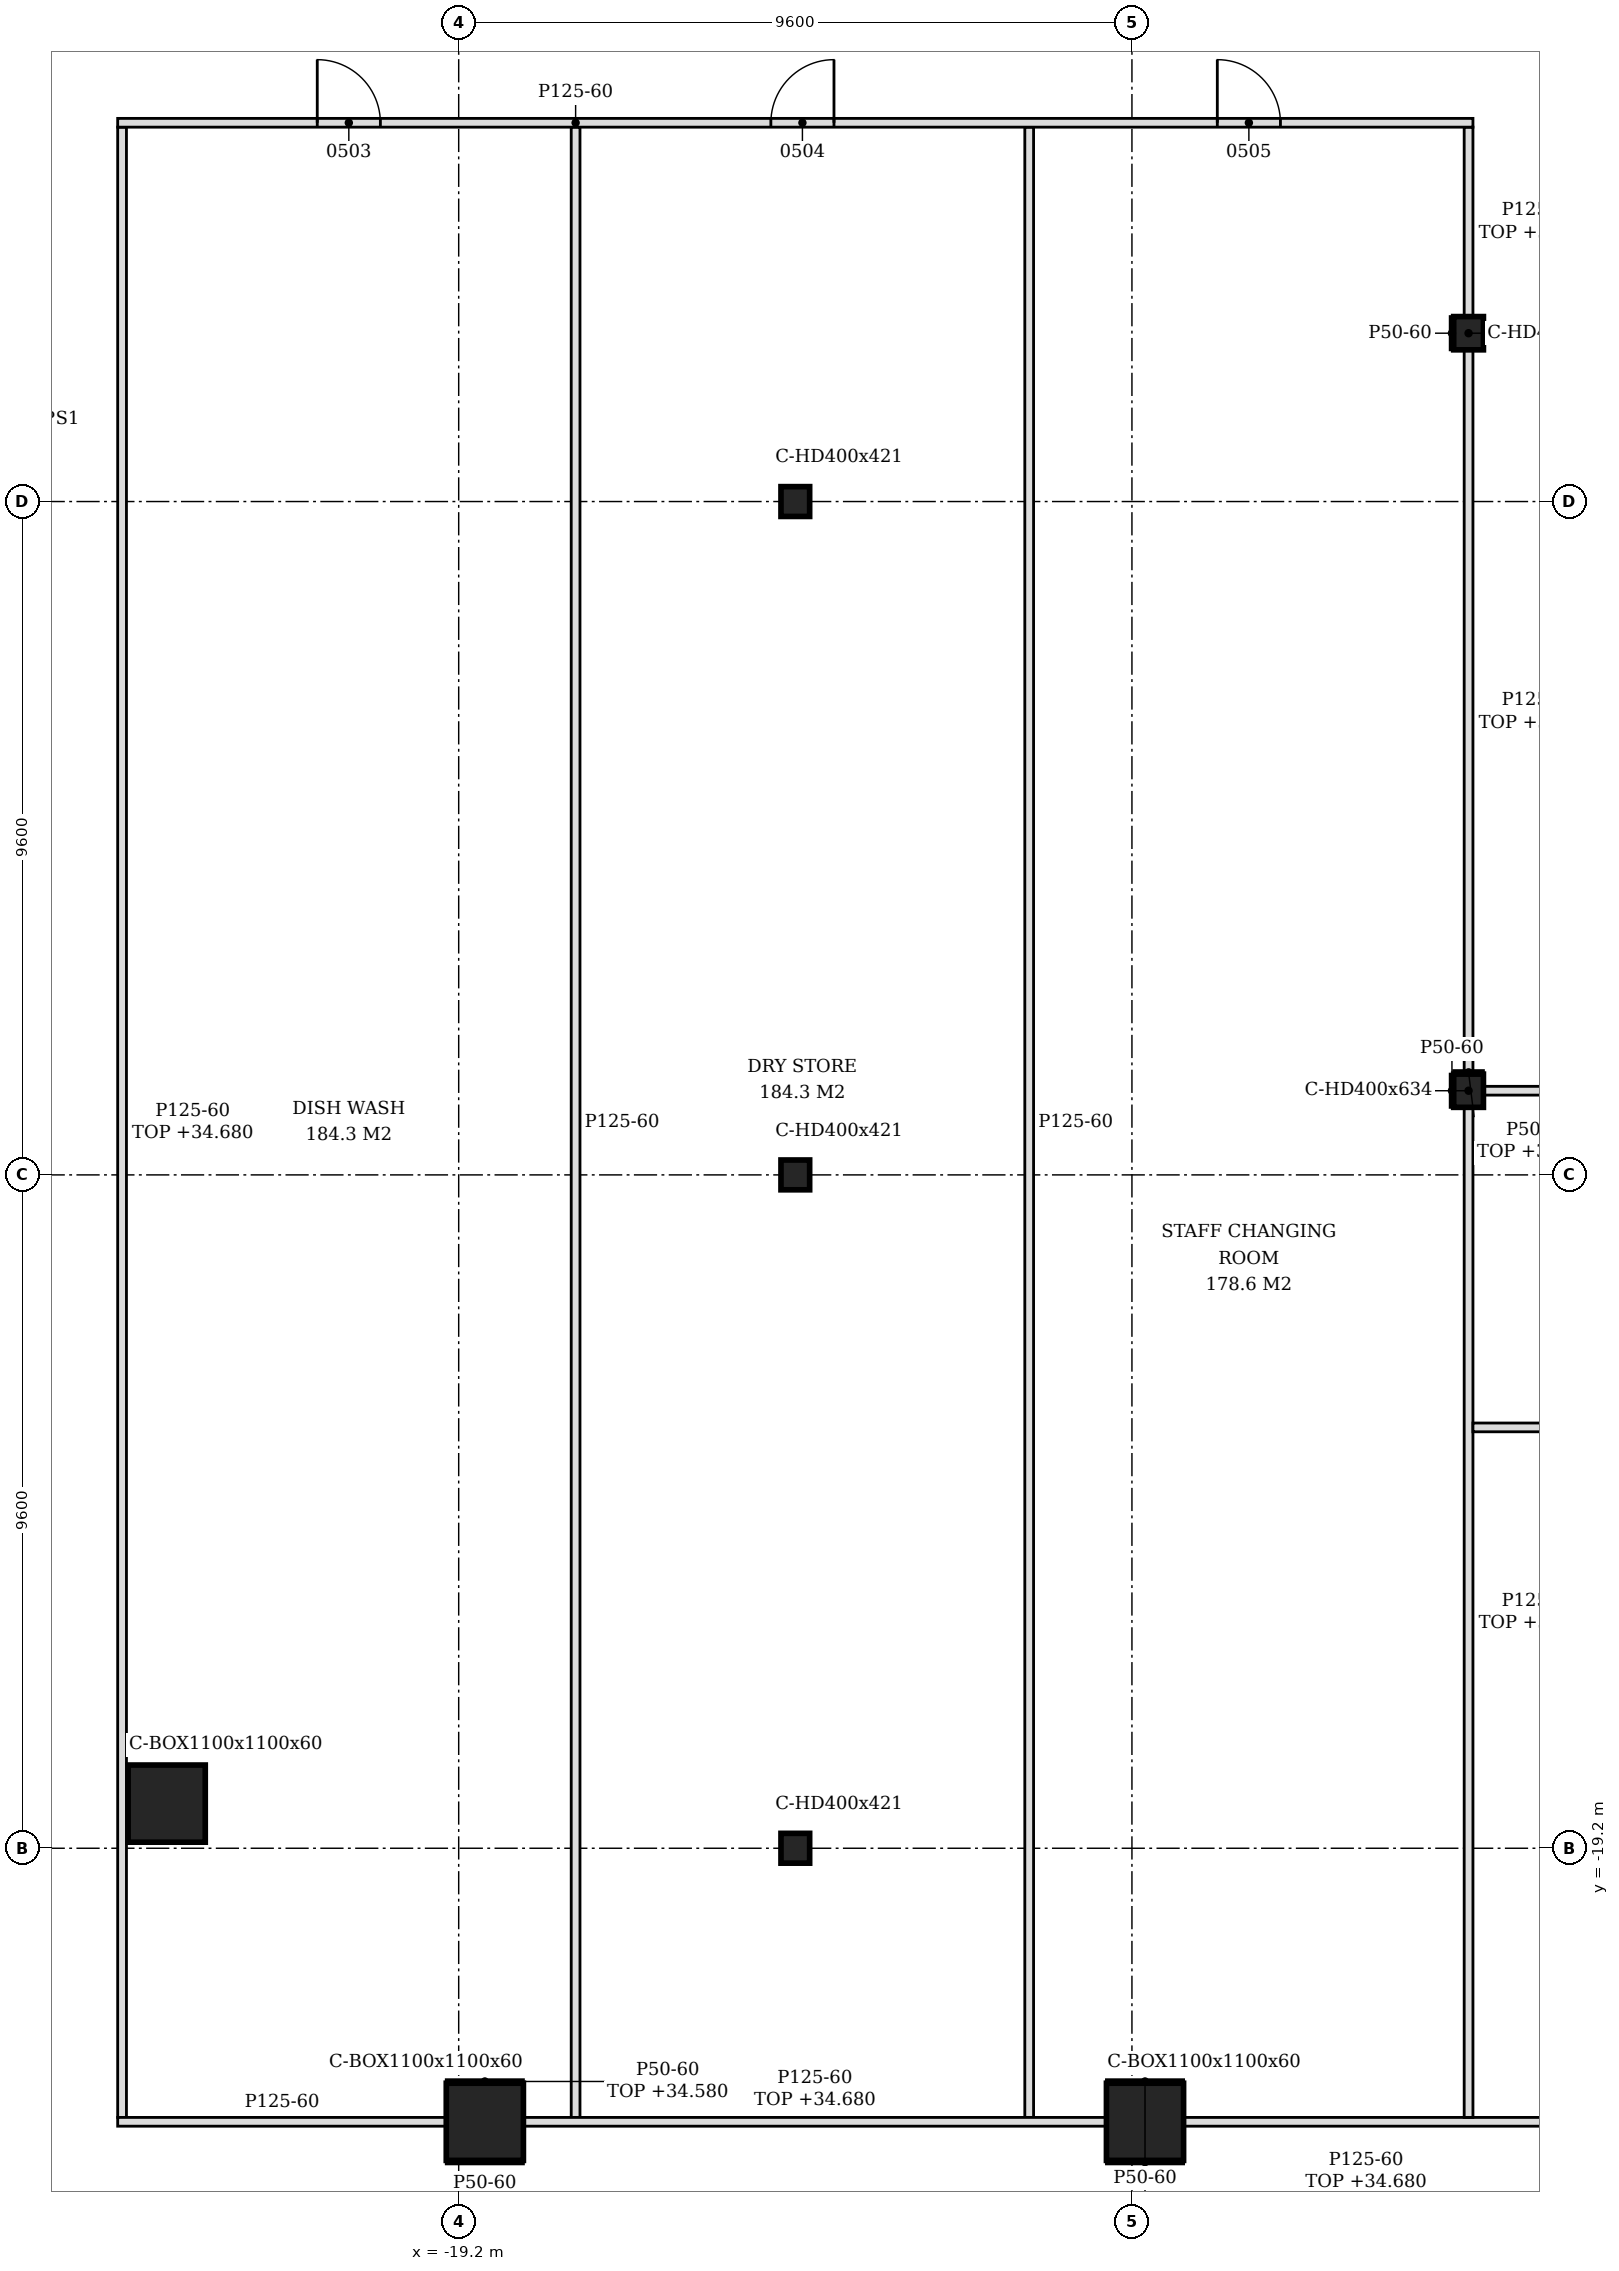
"""IFC4 building model, lengths in metres.
Left out: names, types, materials, properties, quantities, classifications, styles, units other than length and angle.
Written with IfcOpenShell. Run it as: python <this file> out.ifc"""

import sys

from ifc_helpers import new_model, si_unit, direction, frame, frame_2d, origin, origin_2d, place, context, subcontext, project, spatial, polyline, rectangle, hollow_rectangle, i_section, outline, extrude, element, fill, save


model = new_model("IFC4")
c1 = context("Model", 3, precision=1e-05, world=origin(), true_north=direction((0.0, 1.0)))
c2 = subcontext(c1, "Body", "Model", "MODEL_VIEW")
j1 = project(units=[si_unit("LENGTHUNIT", "METRE"), si_unit("PLANEANGLEUNIT", "RADIAN")], contexts=[c1])
p1 = place(None, origin())
s1 = spatial("IfcSite", under=j1, at=p1, CompositionType="ELEMENT")
p2 = place(p1, origin())
s2 = spatial("IfcBuilding", under=s1, at=p2, CompositionType="ELEMENT")
p3 = place(p2, frame((0.0, 0.0, 30.6)))
s3 = spatial("IfcBuildingStorey", under=s2, at=p3, CompositionType="ELEMENT", Elevation=30.6)
for number, where, z_axis, x_axis in (
    (1, (-18.827, -23.1, -0.2), (0.0, 0.0, 1.0), (1.0, 0.0, 0.0)),
    (2, (-9.414, -23.1, -0.2), (0.0, 0.0, 1.0), (1.0, 0.0, 0.0)),
    (3, (-23.364, -18.564, -0.2), (0.0, 0.0, 1.0), (1.0, 0.0, 0.0)),
):
    element("IfcColumn", number, at=place(p3, frame(where, z_axis=z_axis, x_axis=x_axis)), inside=s3, PredefinedType="COLUMN", context=c2, shape_type="SweptSolid", body=[
        extrude(hollow_rectangle(XDim=1.1, YDim=1.1, WallThickness=0.06, at=origin_2d()), origin(), (0.0, 0.0, 1.0), 4.8),
    ])
for number, where, z_axis, x_axis in (
    (4, (-4.8, -8.4, -0.2), (0.0, 0.0, 1.0), (1.0, 0.0, 0.0)),
    (5, (-4.8, 2.4, -0.2), (0.0, 0.0, 1.0), (1.0, 0.0, 0.0)),
):
    element("IfcColumn", number, at=place(p3, frame(where, z_axis=z_axis, x_axis=x_axis)), inside=s3, PredefinedType="COLUMN", context=c2, shape_type="SweptSolid", body=[
        extrude(i_section(OverallWidth=0.424, OverallDepth=0.474, WebThickness=0.048, FlangeThickness=0.077, FilletRadius=0.015, at=origin_2d()), origin(), (0.0, 0.0, 1.0), 4.8),
    ])
for number, where, z_axis, x_axis in (
    (6, (-14.4, -19.2, -0.2), (0.0, 0.0, 1.0), (1.0, 0.0, 0.0)),
    (7, (-14.4, -9.6, -0.2), (0.0, 0.0, 1.0), (1.0, 0.0, 0.0)),
    (8, (-14.4, 0.0, -0.2), (0.0, 0.0, 1.0), (1.0, 0.0, 0.0)),
):
    element("IfcColumn", number, at=place(p3, frame(where, z_axis=z_axis, x_axis=x_axis)), inside=s3, PredefinedType="COLUMN", context=c2, shape_type="SweptSolid", body=[
        extrude(i_section(OverallWidth=0.409, OverallDepth=0.425, WebThickness=0.033, FlangeThickness=0.052, FilletRadius=0.015, at=origin_2d()), origin(), (0.0, 0.0, 1.0), 4.8),
    ])
p4 = place(p3, frame((-24.062, -23.1, 0.0), z_axis=(0.0, 0.0, 1.0), x_axis=(1.0, 0.0, 0.0)))
e9 = element("IfcWall", 9, at=p4, inside=s3, PredefinedType="PARTITIONING", context=c2, shape_type="SweptSolid", body=[
    extrude(rectangle(XDim=4.685, YDim=0.125, at=frame_2d((2.343, 0.0))), origin(), (0.0, 0.0, 1.0), 4.6),
])
p5 = place(p3, frame((-18.277, -23.1, 0.0), z_axis=(0.0, 0.0, 1.0), x_axis=(1.0, 0.0, 0.0)))
e10 = element("IfcWall", 10, at=p5, inside=s3, PredefinedType="PARTITIONING", context=c2, shape_type="SweptSolid", body=[
    extrude(rectangle(XDim=8.313, YDim=0.125, at=frame_2d((4.157, 0.0))), origin(), (0.0, 0.0, 1.0), 4.08),
])
p6 = place(p3, frame((-8.864, -23.1, 0.0), z_axis=(0.0, 0.0, 1.0), x_axis=(1.0, 0.0, 0.0)))
e11 = element("IfcWall", 11, at=p6, inside=s3, PredefinedType="PARTITIONING", context=c2, shape_type="SweptSolid", body=[
    extrude(rectangle(XDim=8.313, YDim=0.125, at=frame_2d((4.157, 0.0))), origin(), (0.0, 0.0, 1.0), 4.08),
])
p7 = place(p6, frame((6.614, 0.0, 0.0)))
e12 = element("IfcOpeningElement", 12, at=p7, cuts=e11, PredefinedType="OPENING", context=c2, shape_type="SweptSolid", body=[
    extrude(rectangle(XDim=0.9, YDim=2.1, at=frame_2d((0.45, 1.05))), frame((0.0, 0.073, 0.0), z_axis=(0.0, -1.0, 0.0), x_axis=(1.0, 0.0, 0.0)), (0.0, 0.0, 1.0), 0.145),
])
p8 = place(p3, frame((-24.0, -23.038, 0.0), z_axis=(0.0, 0.0, 1.0), x_axis=(0.0, 1.0, 0.0)))
e13 = element("IfcWall", 13, at=p8, inside=s3, PredefinedType="PARTITIONING", context=c2, shape_type="SweptSolid", body=[
    extrude(outline(polyline([(0.0, 0.0), (28.375, 0.0), (28.375, 4.08), (23.188, 4.08), (23.186, 3.88), (22.887, 3.88), (22.885, 4.08), (13.587, 4.08), (13.585, 3.88), (13.288, 3.88), (13.285, 4.08), (3.988, 4.08), (3.986, 3.98), (3.688, 3.98), (3.686, 4.08), (0.0, 4.08), (0.0, 0.0)])), frame((0.0, 0.062, 0.0), z_axis=(0.0, -1.0, 0.0), x_axis=(1.0, 0.0, 0.0)), (0.0, 0.0, 1.0), 0.125),
])
p9 = place(p3, frame((-17.533, -23.038, 0.0), z_axis=(0.0, 0.0, 1.0), x_axis=(0.0, 1.0, 0.0)))
e14 = element("IfcWall", 14, at=p9, inside=s3, PredefinedType="PARTITIONING", context=c2, shape_type="SweptSolid", body=[
    extrude(outline(polyline([(0.0, 0.0), (28.375, 0.0), (28.375, 4.6), (23.188, 4.6), (23.186, 3.88), (22.887, 3.88), (22.885, 4.6), (13.587, 4.6), (13.585, 3.88), (13.288, 3.88), (13.285, 4.6), (0.087, 4.6), (0.085, 4.08), (0.0, 4.08), (0.0, 0.0)])), frame((0.0, 0.062, 0.0), z_axis=(0.0, -1.0, 0.0), x_axis=(1.0, 0.0, 0.0)), (0.0, 0.0, 1.0), 0.125),
])
p10 = place(p3, frame((-11.065, -23.038, 0.0), z_axis=(0.0, 0.0, 1.0), x_axis=(0.0, 1.0, 0.0)))
e15 = element("IfcWall", 15, at=p10, inside=s3, PredefinedType="PARTITIONING", context=c2, shape_type="SweptSolid", body=[
    extrude(outline(polyline([(0.0, 0.0), (28.375, 0.0), (28.375, 4.6), (23.188, 4.6), (23.186, 4.08), (22.887, 4.08), (22.885, 4.6), (0.087, 4.6), (0.085, 4.08), (0.0, 4.08), (0.0, 0.0)])), frame((0.0, 0.062, 0.0), z_axis=(0.0, -1.0, 0.0), x_axis=(1.0, 0.0, 0.0)), (0.0, 0.0, 1.0), 0.125),
])
p11 = place(p3, frame((-4.8, -23.038, 0.0), z_axis=(0.0, 0.0, 1.0), x_axis=(0.0, 1.0, 0.0)))
e16 = element("IfcWall", 16, at=p11, inside=s3, PredefinedType="PARTITIONING", context=c2, shape_type="SweptSolid", body=[
    extrude(rectangle(XDim=14.401, YDim=0.125, at=frame_2d((7.2, 0.0))), origin(), (0.0, 0.0, 1.0), 3.98),
])
p12 = place(p3, frame((-4.738, -13.2, 0.0), z_axis=(0.0, 0.0, 1.0), x_axis=(1.0, 0.0, 0.0)))
e17 = element("IfcWall", 17, at=p12, inside=s3, PredefinedType="PARTITIONING", context=c2, shape_type="SweptSolid", body=[
    extrude(outline(polyline([(0.0, 0.0), (23.875, 0.0), (23.875, 3.98), (23.788, 3.98), (23.785, 4.6), (19.288, 4.6), (19.285, 3.98), (18.988, 3.98), (18.986, 4.6), (14.488, 4.6), (14.486, 3.98), (14.188, 3.98), (14.186, 4.6), (9.688, 4.6), (9.686, 3.98), (9.387, 3.98), (9.385, 4.6), (4.887, 4.6), (4.885, 3.98), (4.587, 3.98), (4.585, 4.6), (0.087, 4.6), (0.085, 3.98), (0.0, 3.98), (0.0, 0.0)])), frame((0.0, 0.062, 0.0), z_axis=(0.0, -1.0, 0.0), x_axis=(1.0, 0.0, 0.0)), (0.0, 0.0, 1.0), 0.125),
])
p13 = place(p3, frame((-4.588, -8.4, 0.0), z_axis=(0.0, 0.0, 1.0), x_axis=(1.0, 0.0, 0.0)))
e18 = element("IfcWall", 18, at=p13, inside=s3, PredefinedType="PARTITIONING", context=c2, shape_type="SweptSolid", body=[
    extrude(rectangle(XDim=11.576, YDim=0.125, at=frame_2d((5.788, 0.0))), origin(), (0.0, 0.0, 1.0), 3.98),
])
p14 = place(p13, frame((5.388, 0.0, 0.0)))
e19 = element("IfcOpeningElement", 19, at=p14, cuts=e18, PredefinedType="OPENING", context=c2, shape_type="SweptSolid", body=[
    extrude(rectangle(XDim=0.8, YDim=2.1, at=frame_2d((0.4, 1.05))), frame((0.0, 0.073, 0.0), z_axis=(0.0, -1.0, 0.0), x_axis=(1.0, 0.0, 0.0)), (0.0, 0.0, 1.0), 0.145),
])
p15 = place(p3, frame((-4.8, -8.163, 0.0), z_axis=(0.0, 0.0, 1.0), x_axis=(0.0, 1.0, 0.0)))
e20 = element("IfcWall", 20, at=p15, inside=s3, PredefinedType="PARTITIONING", context=c2, shape_type="SweptSolid", body=[
    extrude(rectangle(XDim=10.326, YDim=0.125, at=frame_2d((5.163, 0.0))), origin(), (0.0, 0.0, 1.0), 3.98),
])
p16 = place(p3, frame((-4.8, 2.637, 0.0), z_axis=(0.0, 0.0, 1.0), x_axis=(0.0, 1.0, 0.0)))
e21 = element("IfcWall", 21, at=p16, inside=s3, PredefinedType="PARTITIONING", context=c2, shape_type="SweptSolid", body=[
    extrude(rectangle(XDim=2.7, YDim=0.125, at=frame_2d((1.35, 0.0))), origin(), (0.0, 0.0, 1.0), 3.98),
])
p17 = place(p3, frame((-24.062, 5.4, 0.0), z_axis=(0.0, 0.0, 1.0), x_axis=(1.0, 0.0, 0.0)))
e22 = element("IfcWall", 22, at=p17, inside=s3, PredefinedType="PARTITIONING", context=c2, shape_type="SweptSolid", body=[
    extrude(outline(polyline([(0.0, 0.0), (19.325, 0.0), (19.325, 3.98), (19.113, 3.98), (19.111, 4.6), (14.562, 4.6), (14.561, 4.08), (14.363, 4.08), (14.361, 4.6), (9.762, 4.6), (9.76, 4.08), (9.562, 4.08), (9.561, 4.6), (4.962, 4.6), (4.96, 4.08), (4.762, 4.08), (4.76, 4.6), (0.163, 4.6), (0.16, 4.08), (0.0, 4.08), (0.0, 0.0)])), frame((0.0, 0.062, 0.0), z_axis=(0.0, -1.0, 0.0), x_axis=(1.0, 0.0, 0.0)), (0.0, 0.0, 1.0), 0.125),
])
p18 = place(p17, frame((2.846, 0.0, 0.0)))
e23 = element("IfcOpeningElement", 23, at=p18, cuts=e22, PredefinedType="OPENING", context=c2, shape_type="SweptSolid", body=[
    extrude(rectangle(XDim=0.9, YDim=2.1, at=frame_2d((0.45, 1.05))), frame((0.0, 0.073, 0.0), z_axis=(0.0, -1.0, 0.0), x_axis=(1.0, 0.0, 0.0)), (0.0, 0.0, 1.0), 0.145),
])
p19 = place(p17, frame((9.314, 0.0, 0.0)))
e24 = element("IfcOpeningElement", 24, at=p19, cuts=e22, PredefinedType="OPENING", context=c2, shape_type="SweptSolid", body=[
    extrude(rectangle(XDim=0.9, YDim=2.1, at=frame_2d((0.45, 1.05))), frame((0.0, 0.073, 0.0), z_axis=(0.0, -1.0, 0.0), x_axis=(1.0, 0.0, 0.0)), (0.0, 0.0, 1.0), 0.145),
])
p20 = place(p17, frame((15.68, 0.0, 0.0)))
e25 = element("IfcOpeningElement", 25, at=p20, cuts=e22, PredefinedType="OPENING", context=c2, shape_type="SweptSolid", body=[
    extrude(rectangle(XDim=0.9, YDim=2.1, at=frame_2d((0.45, 1.05))), frame((0.0, 0.073, 0.0), z_axis=(0.0, -1.0, 0.0), x_axis=(1.0, 0.0, 0.0)), (0.0, 0.0, 1.0), 0.145),
])
p21 = place(p3, frame((-19.377, -23.675, 0.0), z_axis=(0.0, 0.0, 1.0), x_axis=(1.0, 0.0, 0.0)))
e26 = element("IfcWall", 26, at=p21, inside=s3, PredefinedType="PARTITIONING", context=c2, shape_type="SweptSolid", body=[
    extrude(rectangle(XDim=1.1, YDim=0.05, at=frame_2d((0.55, 0.0))), origin(), (0.0, 0.0, 1.0), 4.22),
])
p22 = place(p3, frame((-19.377, -22.525, 0.0), z_axis=(0.0, 0.0, 1.0), x_axis=(1.0, 0.0, 0.0)))
e27 = element("IfcWall", 27, at=p22, inside=s3, PredefinedType="PARTITIONING", context=c2, shape_type="SweptSolid", body=[
    extrude(rectangle(XDim=1.1, YDim=0.05, at=frame_2d((0.55, 0.0))), origin(), (0.0, 0.0, 1.0), 3.98),
])
p23 = place(p3, frame((-9.964, -22.525, 0.0), z_axis=(0.0, 0.0, 1.0), x_axis=(1.0, 0.0, 0.0)))
e28 = element("IfcWall", 28, at=p23, inside=s3, PredefinedType="PARTITIONING", context=c2, shape_type="SweptSolid", body=[
    extrude(rectangle(XDim=1.1, YDim=0.05, at=frame_2d((0.55, 0.0))), origin(), (0.0, 0.0, 1.0), 4.6),
])
p24 = place(p3, frame((-9.964, -23.675, 0.0), z_axis=(0.0, 0.0, 1.0), x_axis=(1.0, 0.0, 0.0)))
e29 = element("IfcWall", 29, at=p24, inside=s3, PredefinedType="PARTITIONING", context=c2, shape_type="SweptSolid", body=[
    extrude(rectangle(XDim=1.1, YDim=0.05, at=frame_2d((0.55, 0.0))), origin(), (0.0, 0.0, 1.0), 4.22),
])
for number, where, z_axis, x_axis in (
    (30, (-5.037, -8.637, 0.0), (0.0, 0.0, 1.0), (0.0, 1.0, 0.0)),
    (31, (-5.037, 2.163, 0.0), (0.0, 0.0, 1.0), (0.0, 1.0, 0.0)),
):
    element("IfcWall", number, at=place(p3, frame(where, z_axis=z_axis, x_axis=x_axis)), inside=s3, PredefinedType="PARTITIONING", context=c2, shape_type="SweptSolid", body=[
        extrude(rectangle(XDim=0.474, YDim=0.05, at=frame_2d((0.237, 0.0))), origin(), (0.0, 0.0, 1.0), 4.6),
    ])
p25 = place(p3, frame((-5.012, -8.138, 0.0), z_axis=(0.0, 0.0, 1.0), x_axis=(1.0, 0.0, 0.0)))
e32 = element("IfcWall", 32, at=p25, inside=s3, PredefinedType="PARTITIONING", context=c2, shape_type="SweptSolid", body=[
    extrude(rectangle(XDim=0.424, YDim=0.05, at=frame_2d((0.212, 0.0))), origin(), (0.0, 0.0, 1.0), 3.98),
])
p26 = place(p18, origin())
e33 = element("IfcDoor", 33, at=p26, inside=s3, OperationType="SINGLE_SWING_LEFT", PredefinedType="DOOR", context=c2, shape_type="SweptSolid", body=[
    extrude(rectangle(XDim=0.9, YDim=2.1, at=frame_2d((0.45, 1.05))), frame((0.0, 0.025, 0.0), z_axis=(0.0, -1.0, 0.0), x_axis=(1.0, 0.0, 0.0)), (0.0, 0.0, 1.0), 0.05),
])
fill(e23, e33)
p27 = place(p19, origin())
e34 = element("IfcDoor", 34, at=p27, inside=s3, OperationType="SINGLE_SWING_RIGHT", PredefinedType="DOOR", context=c2, shape_type="SweptSolid", body=[
    extrude(rectangle(XDim=0.9, YDim=2.1, at=frame_2d((0.45, 1.05))), frame((0.0, 0.025, 0.0), z_axis=(0.0, -1.0, 0.0), x_axis=(1.0, 0.0, 0.0)), (0.0, 0.0, 1.0), 0.05),
])
fill(e24, e34)
p28 = place(p20, origin())
e35 = element("IfcDoor", 35, at=p28, inside=s3, OperationType="SINGLE_SWING_LEFT", PredefinedType="DOOR", context=c2, shape_type="SweptSolid", body=[
    extrude(rectangle(XDim=0.9, YDim=2.1, at=frame_2d((0.45, 1.05))), frame((0.0, 0.025, 0.0), z_axis=(0.0, -1.0, 0.0), x_axis=(1.0, 0.0, 0.0)), (0.0, 0.0, 1.0), 0.05),
])
fill(e25, e35)
save(model, sys.argv[1])
